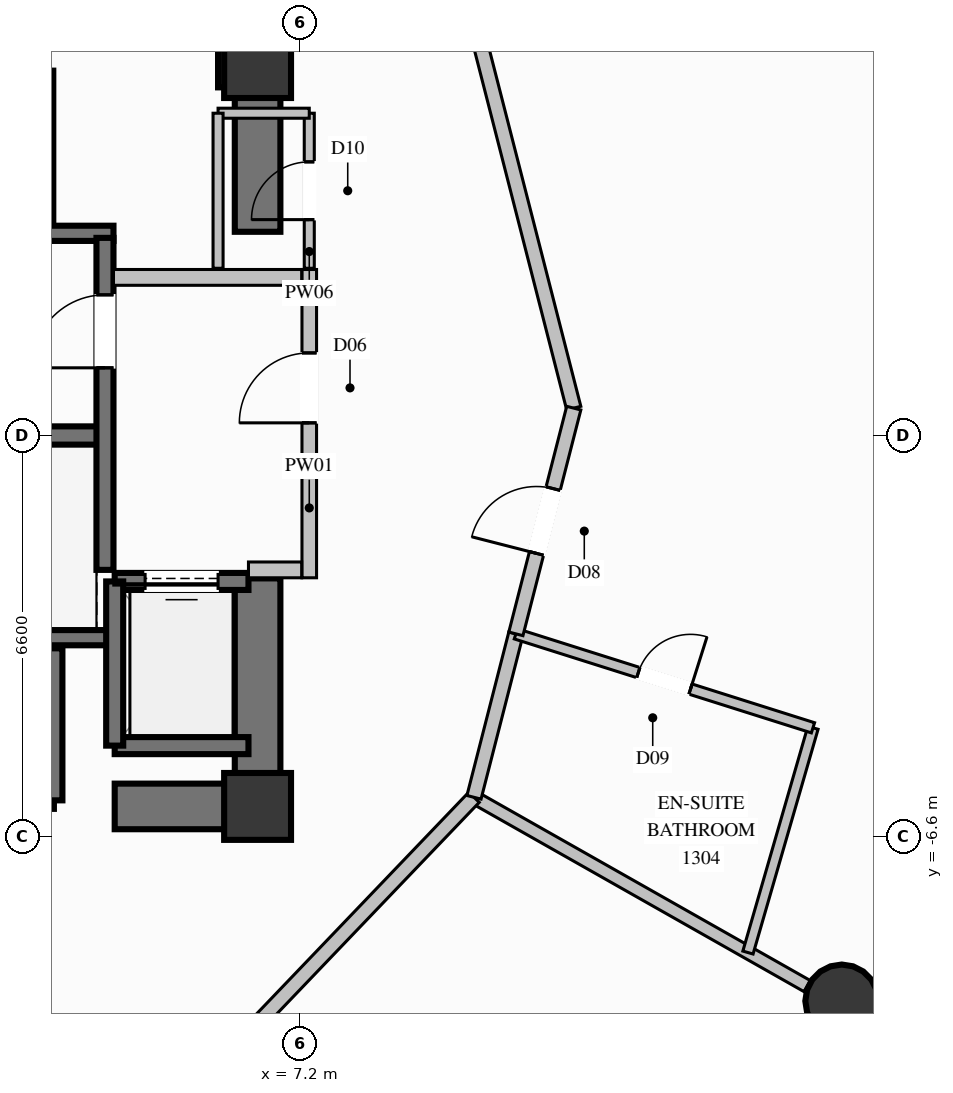
"""IFC4 building model, lengths in metres.
Left out: names, types, materials, properties, quantities, classifications, styles, units other than length and angle.
Written with IfcOpenShell. Run it as: python <this file> out.ifc"""

import sys

from ifc_helpers import new_model, si_unit, direction, frame, frame_2d, origin, origin_2d, place, context, subcontext, project, spatial, rectangle, circle, extrude, element, fill, save


model = new_model("IFC4")
c1 = context("Model", 3, precision=1e-05, world=origin(), true_north=direction((0.0, 1.0)))
c2 = subcontext(c1, "Body", "Model", "MODEL_VIEW")
j1 = project(units=[si_unit("LENGTHUNIT", "METRE"), si_unit("PLANEANGLEUNIT", "RADIAN")], contexts=[c1])
p1 = place(None, origin())
s1 = spatial("IfcSite", under=j1, at=p1, CompositionType="ELEMENT")
p2 = place(p1, origin())
s2 = spatial("IfcBuilding", under=s1, at=p2, CompositionType="ELEMENT")
p3 = place(p2, frame((0.0, 0.0, 50.0)))
s3 = spatial("IfcBuildingStorey", under=s2, at=p3, CompositionType="ELEMENT", Elevation=50.0)
for number, where, z_axis, x_axis in (
    (1, (6.5, -6.1, 0.0), (0.0, 0.0, 1.0), (1.0, 0.0, 0.0)),
    (2, (6.5, 6.1, 0.0), (0.0, 0.0, 1.0), (1.0, 0.0, 0.0)),
):
    element("IfcColumn", number, at=place(p3, frame(where, z_axis=z_axis, x_axis=x_axis)), inside=s3, PredefinedType="COLUMN", context=c2, shape_type="SweptSolid", body=[
        extrude(rectangle(XDim=1.1, YDim=1.1, at=origin_2d()), origin(), (0.0, 0.0, 1.0), 3.6),
    ])
p4 = place(p3, frame((-3.99, 0.0, 0.0), z_axis=(0.0, 0.0, 1.0), x_axis=(1.0, 0.0, 0.0)))
e3 = element("IfcWall", 3, at=p4, inside=s3, PredefinedType="SHEAR", context=c2, shape_type="SweptSolid", body=[
    extrude(rectangle(XDim=7.98, YDim=0.3, at=frame_2d((3.99, 0.0))), origin(), (0.0, 0.0, 1.0), 3.6),
])
for number, where, z_axis, x_axis in (
    (4, (-4.13, -3.325, 0.0), (0.0, 0.0, 1.0), (1.0, 0.0, 0.0)),
    (5, (-4.13, 3.325, 0.0), (0.0, 0.0, 1.0), (1.0, 0.0, 0.0)),
):
    element("IfcWall", number, at=place(p3, frame(where, z_axis=z_axis, x_axis=x_axis)), inside=s3, PredefinedType="SOLIDWALL", context=c2, shape_type="SweptSolid", body=[
        extrude(rectangle(XDim=8.26, YDim=0.25, at=frame_2d((4.13, 0.0))), origin(), (0.0, 0.0, 1.0), 3.6),
    ])
p5 = place(p3, frame((4.15, -6.1, 0.0), z_axis=(0.0, 0.0, 1.0), x_axis=(1.0, 0.0, 0.0)))
e6 = element("IfcWall", 6, at=p5, inside=s3, PredefinedType="SHEAR", context=c2, shape_type="SweptSolid", body=[
    extrude(rectangle(XDim=1.975, YDim=0.75, at=frame_2d((0.988, 0.0))), origin(), (0.0, 0.0, 1.0), 3.6),
])
p6 = place(p3, frame((5.85, 6.1, 0.0), z_axis=(0.0, 0.0, 1.0), x_axis=(1.0, 0.0, 0.0)))
e7 = element("IfcWall", 7, at=p6, inside=s3, PredefinedType="SHEAR", context=c2, shape_type="SweptSolid", body=[
    extrude(rectangle(XDim=0.275, YDim=0.75, at=frame_2d((0.137, 0.0))), origin(), (0.0, 0.0, 1.0), 3.6),
])
p7 = place(p3, frame((6.5, -6.475, 0.0), z_axis=(0.0, 0.0, 1.0), x_axis=(0.0, 1.0, 0.0)))
e8 = element("IfcWall", 8, at=p7, inside=s3, PredefinedType="SHEAR", context=c2, shape_type="SweptSolid", body=[
    extrude(rectangle(XDim=4.125, YDim=0.75, at=frame_2d((2.062, 0.0))), origin(), (0.0, 0.0, 1.0), 3.6),
])
p8 = place(p3, frame((6.5, 3.35, 0.0), z_axis=(0.0, 0.0, 1.0), x_axis=(0.0, 1.0, 0.0)))
e9 = element("IfcWall", 9, at=p8, inside=s3, PredefinedType="SHEAR", context=c2, shape_type="SweptSolid", body=[
    extrude(rectangle(XDim=3.125, YDim=0.75, at=frame_2d((1.562, 0.0))), origin(), (0.0, 0.0, 1.0), 3.6),
])
p9 = place(p3, frame((16.108, -9.3, 0.0), z_axis=(0.0, 0.0, 1.0), x_axis=(1.0, 0.0, 0.0)))
e10 = element("IfcColumn", 10, at=p9, inside=s3, PredefinedType="COLUMN", context=c2, shape_type="SweptSolid", body=[
    extrude(circle(Radius=0.6, at=origin_2d()), origin(), (0.0, 0.0, 1.0), 3.6),
])
p10 = place(p3, frame((1.05, -6.0, 0.0), z_axis=(0.0, 0.0, 1.0), x_axis=(1.0, 0.0, 0.0)))
e11 = element("IfcWall", 11, at=p10, inside=s3, PredefinedType="SOLIDWALL", context=c2, shape_type="SweptSolid", body=[
    extrude(rectangle(XDim=2.1, YDim=0.28, at=frame_2d((1.05, 0.0))), origin(), (0.0, 0.0, 1.0), 3.34),
])
for number, where, z_axis, x_axis in (
    (12, (3.15, -6.0, 0.0), (0.0, 0.0, 1.0), (0.0, 1.0, 0.0)),
    (13, (3.0, 3.5, 0.0), (0.0, 0.0, 1.0), (0.0, 1.0, 0.0)),
):
    element("IfcWall", number, at=place(p3, frame(where, z_axis=z_axis, x_axis=x_axis)), inside=s3, PredefinedType="SOLIDWALL", context=c2, shape_type="SweptSolid", body=[
        extrude(rectangle(XDim=2.5, YDim=0.28, at=frame_2d((1.25, 0.0))), origin(), (0.0, 0.0, 1.0), 3.34),
    ])
p11 = place(p3, frame((4.15, -5.1, 0.0), z_axis=(0.0, 0.0, 1.0), x_axis=(1.0, 0.0, 0.0)))
e14 = element("IfcWall", 14, at=p11, inside=s3, PredefinedType="SOLIDWALL", context=c2, shape_type="SweptSolid", body=[
    extrude(rectangle(XDim=2.2, YDim=0.28, at=frame_2d((1.1, 0.0))), origin(), (0.0, 0.0, 1.0), 3.34),
])
p12 = place(p3, frame((6.35, -2.4, 0.0), z_axis=(0.0, 0.0, 1.0), x_axis=(-1.0, 0.0, 0.0)))
e15 = element("IfcWall", 15, at=p12, inside=s3, PredefinedType="SOLIDWALL", context=c2, shape_type="SweptSolid", body=[
    extrude(rectangle(XDim=2.2, YDim=0.28, at=frame_2d((1.1, 0.0))), origin(), (0.0, 0.0, 1.0), 3.34),
])
p13 = place(p12, frame((0.5, 0.0, 0.0)))
e16 = element("IfcOpeningElement", 16, at=p13, cuts=e15, PredefinedType="OPENING", context=c2, shape_type="SweptSolid", body=[
    extrude(rectangle(XDim=1.2, YDim=2.2, at=frame_2d((0.6, 1.1))), frame((0.0, 0.15, 0.0), z_axis=(0.0, -1.0, 0.0), x_axis=(1.0, 0.0, 0.0)), (0.0, 0.0, 1.0), 0.3),
])
p14 = place(p3, frame((4.15, -2.4, 0.0), z_axis=(0.0, 0.0, 1.0), x_axis=(0.0, -1.0, 0.0)))
e17 = element("IfcWall", 17, at=p14, inside=s3, PredefinedType="SOLIDWALL", context=c2, shape_type="SweptSolid", body=[
    extrude(rectangle(XDim=2.7, YDim=0.28, at=frame_2d((1.35, 0.0))), origin(), (0.0, 0.0, 1.0), 3.34),
])
p15 = place(p3, frame((3.99, -2.21, 0.0), z_axis=(0.0, 0.0, 1.0), x_axis=(0.0, 1.0, 0.0)))
e18 = element("IfcWall", 18, at=p15, inside=s3, PredefinedType="SOLIDWALL", context=c2, shape_type="SweptSolid", body=[
    extrude(rectangle(XDim=5.46, YDim=0.28, at=frame_2d((2.73, 0.0))), origin(), (0.0, 0.0, 1.0), 3.34),
])
p16 = place(p15, frame((3.323, 0.0, 0.0)))
e19 = element("IfcOpeningElement", 19, at=p16, cuts=e18, PredefinedType="OPENING", context=c2, shape_type="SweptSolid", body=[
    extrude(rectangle(XDim=1.2, YDim=2.2, at=frame_2d((0.6, 1.1))), frame((0.0, 0.15, 0.0), z_axis=(0.0, -1.0, 0.0), x_axis=(1.0, 0.0, 0.0)), (0.0, 0.0, 1.0), 0.3),
])
p17 = place(p3, frame((7.35, -2.34, 0.0), z_axis=(0.0, 0.0, 1.0), x_axis=(0.0, 1.0, 0.0)))
e20 = element("IfcWall", 20, at=p17, inside=s3, PredefinedType="PARTITIONING", context=c2, shape_type="SweptSolid", body=[
    extrude(rectangle(XDim=5.07, YDim=0.24, at=frame_2d((2.535, 0.0))), origin(), (0.0, 0.0, 1.0), 2.425),
])
p18 = place(p17, frame((2.548, 0.0, 0.0)))
e21 = element("IfcOpeningElement", 21, at=p18, cuts=e20, PredefinedType="OPENING", context=c2, shape_type="SweptSolid", body=[
    extrude(rectangle(XDim=1.15, YDim=2.2, at=frame_2d((0.575, 1.1))), frame((0.0, 0.13, 0.0), z_axis=(0.0, -1.0, 0.0), x_axis=(1.0, 0.0, 0.0)), (0.0, 0.0, 1.0), 0.26),
])
p19 = place(p3, frame((6.35, -2.21, 0.0), z_axis=(0.0, 0.0, 1.0), x_axis=(1.0, 0.0, 0.0)))
e22 = element("IfcWall", 22, at=p19, inside=s3, PredefinedType="PARTITIONING", context=c2, shape_type="SweptSolid", body=[
    extrude(rectangle(XDim=0.875, YDim=0.26, at=frame_2d((0.438, 0.0))), origin(), (0.0, 0.0, 1.0), 3.34),
])
p20 = place(p3, frame((4.13, 2.6, 0.0), z_axis=(0.0, 0.0, 1.0), x_axis=(1.0, 0.0, 0.0)))
e23 = element("IfcWall", 23, at=p20, inside=s3, PredefinedType="PARTITIONING", context=c2, shape_type="SweptSolid", body=[
    extrude(rectangle(XDim=3.095, YDim=0.26, at=frame_2d((1.548, 0.0))), origin(), (0.0, 0.0, 1.0), 3.34),
])
p21 = place(p3, frame((7.35, 2.75, 0.0), z_axis=(0.0, 0.0, 1.0), x_axis=(0.0, 1.0, 0.0)))
e24 = element("IfcWall", 24, at=p21, inside=s3, PredefinedType="PARTITIONING", context=c2, shape_type="SweptSolid", body=[
    extrude(rectangle(XDim=2.55, YDim=0.165, at=frame_2d((1.275, 0.0))), origin(), (0.0, 0.0, 1.0), 3.34),
])
p22 = place(p21, frame((0.8, 0.0, 0.0)))
e25 = element("IfcOpeningElement", 25, at=p22, cuts=e24, PredefinedType="OPENING", context=c2, shape_type="SweptSolid", body=[
    extrude(rectangle(XDim=0.95, YDim=2.1, at=frame_2d((0.475, 1.05))), frame((0.0, 0.093, 0.0), z_axis=(0.0, -1.0, 0.0), x_axis=(1.0, 0.0, 0.0)), (0.0, 0.0, 1.0), 0.185),
])
p23 = place(p3, frame((7.35, 5.3, 0.0), z_axis=(0.0, 0.0, 1.0), x_axis=(-1.0, 0.0, 0.0)))
e26 = element("IfcWall", 26, at=p23, inside=s3, PredefinedType="PARTITIONING", context=c2, shape_type="SweptSolid", body=[
    extrude(rectangle(XDim=1.5, YDim=0.165, at=frame_2d((0.75, 0.0))), origin(), (0.0, 0.0, 1.0), 2.425),
])
p24 = place(p3, frame((5.85, 5.3, 0.0), z_axis=(0.0, 0.0, 1.0), x_axis=(0.0, -1.0, 0.0)))
e27 = element("IfcWall", 27, at=p24, inside=s3, PredefinedType="PARTITIONING", context=c2, shape_type="SweptSolid", body=[
    extrude(rectangle(XDim=2.55, YDim=0.165, at=frame_2d((1.275, 0.0))), origin(), (0.0, 0.0, 1.0), 2.425),
])
p25 = place(p3, frame((10.059, -5.95, 0.0), z_axis=(0.0, 0.0, 1.0), x_axis=(0.870045461468, -0.492971495097, 0.0)))
e28 = element("IfcWall", 28, at=p25, inside=s3, PredefinedType="PARTITIONING", context=c2, shape_type="SweptSolid", body=[
    extrude(rectangle(XDim=6.299, YDim=0.21, at=frame_2d((3.149, 0.0))), origin(), (0.0, 0.0, 1.0), 2.708),
])
p26 = place(p3, frame((5.575, -10.635, 0.0), z_axis=(0.0, 0.0, 1.0), x_axis=(0.691445702336, 0.722428432941, 0.0)))
e29 = element("IfcWall", 29, at=p26, inside=s3, PredefinedType="PARTITIONING", context=c2, shape_type="SweptSolid", body=[
    extrude(rectangle(XDim=6.485, YDim=0.24, at=frame_2d((3.243, 0.0))), origin(), (0.0, 0.0, 1.0), 3.34),
])
p27 = place(p3, frame((10.059, -5.95, 0.0), z_axis=(0.0, 0.0, 1.0), x_axis=(0.248286444079, 0.968686658154, 0.0)))
e30 = element("IfcWall", 30, at=p27, inside=s3, PredefinedType="PARTITIONING", context=c2, shape_type="SweptSolid", body=[
    extrude(rectangle(XDim=2.775, YDim=0.24, at=frame_2d((1.387, 0.0))), origin(), (0.0, 0.0, 1.0), 3.34),
])
p28 = place(p3, frame((14.565, -8.503, 0.0), z_axis=(0.0, 0.0, 1.0), x_axis=(0.277862399165, 0.960620886266, 0.0)))
e31 = element("IfcWall", 31, at=p28, inside=s3, PredefinedType="PLUMBINGWALL", context=c2, shape_type="SweptSolid", body=[
    extrude(rectangle(XDim=3.848, YDim=0.175, at=frame_2d((1.924, 0.0))), origin(), (0.0, 0.0, 1.0), 3.34),
])
p29 = place(p3, frame((10.748, -3.262, 0.0), z_axis=(0.0, 0.0, 1.0), x_axis=(0.953471714391, -0.301482486817, 0.0)))
e32 = element("IfcWall", 32, at=p29, inside=s3, PredefinedType="PLUMBINGWALL", context=c2, shape_type="SweptSolid", body=[
    extrude(rectangle(XDim=5.125, YDim=0.175, at=frame_2d((2.562, 0.0))), origin(), (0.0, 0.0, 1.0), 3.34),
])
p30 = place(p29, frame((2.112, 0.0, 0.0)))
e33 = element("IfcOpeningElement", 33, at=p30, cuts=e32, PredefinedType="OPENING", context=c2, shape_type="SweptSolid", body=[
    extrude(rectangle(XDim=0.9, YDim=2.1, at=frame_2d((0.45, 1.05))), frame((0.0, 0.098, 0.0), z_axis=(0.0, -1.0, 0.0), x_axis=(1.0, 0.0, 0.0)), (0.0, 0.0, 1.0), 0.195),
])
p31 = place(p3, frame((11.7, 0.45, 0.0), z_axis=(0.0, 0.0, 1.0), x_axis=(-0.248347790771, 0.968670932164, 0.0)))
e34 = element("IfcWall", 34, at=p31, inside=s3, PredefinedType="PARTITIONING", context=c2, shape_type="SweptSolid", body=[
    extrude(rectangle(XDim=6.607, YDim=0.24, at=frame_2d((3.304, 0.0))), origin(), (0.0, 0.0, 1.0), 2.919),
])
p32 = place(p3, frame((10.748, -3.262, 0.0), z_axis=(0.0, 0.0, 1.0), x_axis=(0.248407539497, 0.968655611826, 0.0)))
e35 = element("IfcWall", 35, at=p32, inside=s3, PredefinedType="PARTITIONING", context=c2, shape_type="SweptSolid", body=[
    extrude(rectangle(XDim=3.832, YDim=0.24, at=frame_2d((1.916, 0.0))), origin(), (0.0, 0.0, 1.0), 2.919),
])
p33 = place(p32, frame((1.366, 0.0, 0.0)))
e36 = element("IfcOpeningElement", 36, at=p33, cuts=e35, PredefinedType="OPENING", context=c2, shape_type="SweptSolid", body=[
    extrude(rectangle(XDim=1.1, YDim=2.3, at=frame_2d((0.55, 1.15))), frame((0.0, 0.13, 0.0), z_axis=(0.0, -1.0, 0.0), x_axis=(1.0, 0.0, 0.0)), (0.0, 0.0, 1.0), 0.26),
])
p34 = place(p13, origin())
e37 = element("IfcDoor", 37, at=p34, inside=s3, OperationType="SLIDING_TO_LEFT", PredefinedType="DOOR", context=c2, shape_type="SweptSolid", body=[
    extrude(rectangle(XDim=1.2, YDim=2.2, at=frame_2d((0.6, 1.1))), frame((0.0, 0.025, 0.0), z_axis=(0.0, -1.0, 0.0), x_axis=(1.0, 0.0, 0.0)), (0.0, 0.0, 1.0), 0.05),
])
fill(e16, e37)
p35 = place(p16, origin())
e38 = element("IfcDoor", 38, at=p35, inside=s3, OperationType="SINGLE_SWING_LEFT", PredefinedType="DOOR", context=c2, shape_type="SweptSolid", body=[
    extrude(rectangle(XDim=1.2, YDim=2.2, at=frame_2d((0.6, 1.1))), frame((0.0, 0.025, 0.0), z_axis=(0.0, -1.0, 0.0), x_axis=(1.0, 0.0, 0.0)), (0.0, 0.0, 1.0), 0.05),
])
fill(e19, e38)
p36 = place(p18, origin())
e39 = element("IfcDoor", 39, at=p36, inside=s3, OperationType="SINGLE_SWING_LEFT", PredefinedType="DOOR", context=c2, shape_type="SweptSolid", body=[
    extrude(rectangle(XDim=1.15, YDim=2.2, at=frame_2d((0.575, 1.1))), frame((0.0, 0.025, 0.0), z_axis=(0.0, -1.0, 0.0), x_axis=(1.0, 0.0, 0.0)), (0.0, 0.0, 1.0), 0.05),
])
fill(e21, e39)
p37 = place(p22, origin())
e40 = element("IfcDoor", 40, at=p37, inside=s3, OperationType="SINGLE_SWING_LEFT", PredefinedType="DOOR", context=c2, shape_type="SweptSolid", body=[
    extrude(rectangle(XDim=0.95, YDim=2.1, at=frame_2d((0.475, 1.05))), frame((0.0, 0.025, 0.0), z_axis=(0.0, -1.0, 0.0), x_axis=(1.0, 0.0, 0.0)), (0.0, 0.0, 1.0), 0.05),
])
fill(e25, e40)
p38 = place(p30, origin())
e41 = element("IfcDoor", 41, at=p38, inside=s3, OperationType="SINGLE_SWING_RIGHT", PredefinedType="DOOR", context=c2, shape_type="SweptSolid", body=[
    extrude(rectangle(XDim=0.9, YDim=2.1, at=frame_2d((0.45, 1.05))), frame((0.0, 0.025, 0.0), z_axis=(0.0, -1.0, 0.0), x_axis=(1.0, 0.0, 0.0)), (0.0, 0.0, 1.0), 0.05),
])
fill(e33, e41)
p39 = place(p33, origin())
e42 = element("IfcDoor", 42, at=p39, inside=s3, OperationType="SINGLE_SWING_LEFT", PredefinedType="DOOR", context=c2, shape_type="SweptSolid", body=[
    extrude(rectangle(XDim=1.1, YDim=2.3, at=frame_2d((0.55, 1.15))), frame((0.0, 0.025, 0.0), z_axis=(0.0, -1.0, 0.0), x_axis=(1.0, 0.0, 0.0)), (0.0, 0.0, 1.0), 0.05),
])
fill(e36, e42)
save(model, sys.argv[1])
